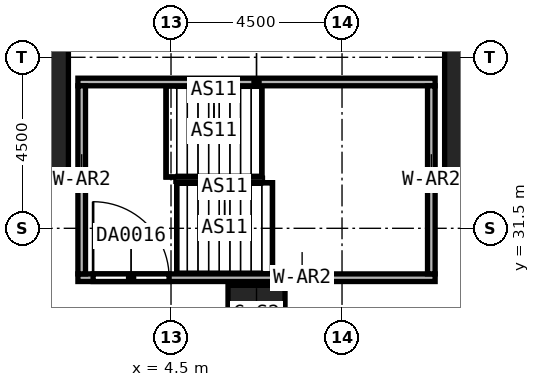
"""IFC4 building model, lengths in metres.
Left out: names, types, materials, properties, quantities, classifications, styles, units other than length and angle.
Written with IfcOpenShell. Run it as: python <this file> out.ifc"""

import sys

from ifc_helpers import new_model, si_unit, direction, frame, frame_2d, origin, origin_2d, place, context, subcontext, project, spatial, rectangle, extrude, element, fill, save


model = new_model("IFC4")
c1 = context("Model", 3, precision=1e-05, world=origin(), true_north=direction((0.0, 1.0)))
c2 = subcontext(c1, "Body", "Model", "MODEL_VIEW")
j1 = project(units=[si_unit("LENGTHUNIT", "METRE"), si_unit("PLANEANGLEUNIT", "RADIAN")], contexts=[c1])
p1 = place(None, origin())
s1 = spatial("IfcSite", under=j1, at=p1, CompositionType="ELEMENT")
p2 = place(p1, origin())
s2 = spatial("IfcBuilding", under=s1, at=p2, CompositionType="ELEMENT")
p3 = place(p2, frame((0.0, 0.0, 25.0)))
s3 = spatial("IfcBuildingStorey", under=s2, at=p3, CompositionType="ELEMENT", Elevation=25.0)
for number, where, z_axis, x_axis in (
    (1, (0.0, 36.0, 0.0), (0.0, 0.0, 1.0), (1.0, 0.0, 0.0)),
    (2, (13.5, 36.0, 0.0), (0.0, 0.0, 1.0), (1.0, 0.0, 0.0)),
):
    element("IfcColumn", number, at=place(p3, frame(where, z_axis=z_axis, x_axis=x_axis)), inside=s3, PredefinedType="COLUMN", context=c2, shape_type="SweptSolid", body=[
        extrude(rectangle(XDim=3.6, YDim=6.0, at=origin_2d()), origin(), (0.0, 0.0, 1.0), 6.0),
    ])
p4 = place(p3, frame((6.75, 29.25, 0.0), z_axis=(0.0, 0.0, 1.0), x_axis=(1.0, 0.0, 0.0)))
e3 = element("IfcColumn", 3, at=p4, inside=s3, PredefinedType="COLUMN", context=c2, shape_type="SweptSolid", body=[
    extrude(rectangle(XDim=1.5, YDim=1.5, at=origin_2d()), origin(), (0.0, 0.0, 1.0), 6.0),
])
p5 = place(p3, frame((2.05, 30.2, 0.0), z_axis=(0.0, 0.0, 1.0), x_axis=(1.0, 0.0, 0.0)))
e4 = element("IfcWall", 4, at=p5, inside=s3, PredefinedType="SOLIDWALL", context=c2, shape_type="SweptSolid", body=[
    extrude(rectangle(XDim=9.4, YDim=0.2, at=frame_2d((4.7, 0.0))), origin(), (0.0, 0.0, 1.0), 6.0),
])
p6 = place(p5, frame((0.4, 0.0, 0.0)))
e5 = element("IfcOpeningElement", 5, at=p6, cuts=e4, PredefinedType="OPENING", context=c2, shape_type="SweptSolid", body=[
    extrude(rectangle(XDim=2.0, YDim=2.4, at=frame_2d((1.0, 1.2))), frame((0.0, 0.1, 0.0), z_axis=(0.0, -1.0, 0.0), x_axis=(1.0, 0.0, 0.0)), (0.0, 0.0, 1.0), 0.2),
])
p7 = place(p3, frame((2.05, 35.35, 0.0), z_axis=(0.0, 0.0, 1.0), x_axis=(1.0, 0.0, 0.0)))
e6 = element("IfcWall", 6, at=p7, inside=s3, PredefinedType="SOLIDWALL", context=c2, shape_type="SweptSolid", body=[
    extrude(rectangle(XDim=9.4, YDim=0.2, at=frame_2d((4.7, 0.0))), origin(), (0.0, 0.0, 1.0), 6.0),
])
for number, where, z_axis, x_axis in (
    (7, (2.15, 30.3, 0.0), (0.0, 0.0, 1.0), (0.0, 1.0, 0.0)),
    (8, (11.35, 30.3, 0.0), (0.0, 0.0, 1.0), (0.0, 1.0, 0.0)),
):
    element("IfcWall", number, at=place(p3, frame(where, z_axis=z_axis, x_axis=x_axis)), inside=s3, PredefinedType="SOLIDWALL", context=c2, shape_type="SweptSolid", body=[
        extrude(rectangle(XDim=4.95, YDim=0.2, at=frame_2d((2.475, 0.0))), origin(), (0.0, 0.0, 1.0), 6.0),
    ])
p8 = place(p6, origin())
e9 = element("IfcDoor", 9, at=p8, inside=s3, OperationType="DOUBLE_DOOR_SINGLE_SWING", PredefinedType="DOOR", context=c2, shape_type="SweptSolid", body=[
    extrude(rectangle(XDim=2.0, YDim=2.4, at=frame_2d((1.0, 1.2))), frame((0.0, 0.025, 0.0), z_axis=(0.0, -1.0, 0.0), x_axis=(1.0, 0.0, 0.0)), (0.0, 0.0, 1.0), 0.05),
])
fill(e5, e9)
save(model, sys.argv[1])
